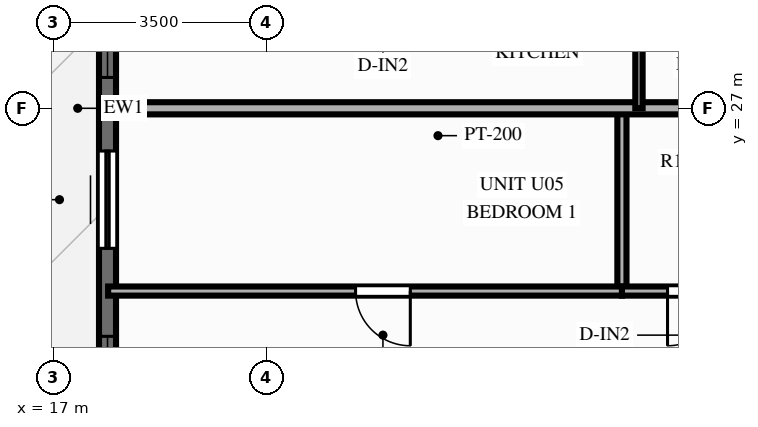
"""IFC4 building model, lengths in metres.
Left out: names, types, materials, properties, quantities, classifications, styles, units other than length and angle.
Written with IfcOpenShell. Run it as: python <this file> out.ifc"""

import sys

from ifc_helpers import new_model, si_unit, direction, frame, frame_2d, origin, place, context, subcontext, project, spatial, rectangle, extrude, source, transform, mapped, element, fill, save


model = new_model("IFC4")
c1 = context("Model", 3, precision=1e-05, world=origin(), true_north=direction((0.0, 1.0)))
c2 = subcontext(c1, "Body", "Model", "MODEL_VIEW")
j1 = project(units=[si_unit("LENGTHUNIT", "METRE"), si_unit("PLANEANGLEUNIT", "RADIAN")], contexts=[c1])
p1 = place(None, origin())
s1 = spatial("IfcSite", under=j1, at=p1, CompositionType="ELEMENT")
p2 = place(p1, origin())
s2 = spatial("IfcBuilding", under=s1, at=p2, CompositionType="ELEMENT")
p3 = place(p2, frame((0.0, 0.0, 186.7)))
s3 = spatial("IfcBuildingStorey", under=s2, at=p3, CompositionType="ELEMENT", Elevation=186.7)
p4 = place(p3, frame((17.89, 11.0, 0.0), z_axis=(0.0, 0.0, 1.0), x_axis=(0.0, 1.0, 0.0)))
e1 = element("IfcWall", 1, at=p4, inside=s3, PredefinedType="SOLIDWALL", context=c2, shape_type="SweptSolid", body=[
    extrude(rectangle(XDim=32.0, YDim=0.28, at=frame_2d((16.0, 0.0))), origin(), (0.0, 0.0, 1.0), 2.28),
])
p5 = place(p4, frame((0.717, 0.0, 0.25)))
e2 = element("IfcOpeningElement", 2, at=p5, cuts=e1, PredefinedType="OPENING", context=c2, shape_type="SweptSolid", body=[
    extrude(rectangle(XDim=1.2, YDim=1.5, at=frame_2d((0.6, 0.75))), frame((0.0, 0.152, 0.0), z_axis=(0.0, -1.0, 0.0), x_axis=(1.0, 0.0, 0.0)), (0.0, 0.0, 1.0), 0.304),
])
p6 = place(p4, frame((3.139, 0.0, 0.25)))
e3 = element("IfcOpeningElement", 3, at=p6, cuts=e1, PredefinedType="OPENING", context=c2, shape_type="SweptSolid", body=[
    extrude(rectangle(XDim=1.2, YDim=1.5, at=frame_2d((0.6, 0.75))), frame((0.0, 0.152, 0.0), z_axis=(0.0, -1.0, 0.0), x_axis=(1.0, 0.0, 0.0)), (0.0, 0.0, 1.0), 0.304),
])
p7 = place(p4, frame((5.447, 0.0, 0.25)))
e4 = element("IfcOpeningElement", 4, at=p7, cuts=e1, PredefinedType="OPENING", context=c2, shape_type="SweptSolid", body=[
    extrude(rectangle(XDim=0.95, YDim=1.5, at=frame_2d((0.475, 0.75))), frame((0.0, 0.152, 0.0), z_axis=(0.0, -1.0, 0.0), x_axis=(1.0, 0.0, 0.0)), (0.0, 0.0, 1.0), 0.304),
])
p8 = place(p4, frame((8.597, 0.0, 0.25)))
e5 = element("IfcOpeningElement", 5, at=p8, cuts=e1, PredefinedType="OPENING", context=c2, shape_type="SweptSolid", body=[
    extrude(rectangle(XDim=1.2, YDim=1.5, at=frame_2d((0.6, 0.75))), frame((0.0, 0.152, 0.0), z_axis=(0.0, -1.0, 0.0), x_axis=(1.0, 0.0, 0.0)), (0.0, 0.0, 1.0), 0.304),
])
p9 = place(p4, frame((11.05, 0.0, 0.25)))
e6 = element("IfcOpeningElement", 6, at=p9, cuts=e1, PredefinedType="OPENING", context=c2, shape_type="SweptSolid", body=[
    extrude(rectangle(XDim=1.2, YDim=1.5, at=frame_2d((0.6, 0.75))), frame((0.0, 0.152, 0.0), z_axis=(0.0, -1.0, 0.0), x_axis=(1.0, 0.0, 0.0)), (0.0, 0.0, 1.0), 0.304),
])
p10 = place(p4, frame((13.697, 0.0, 0.0)))
e7 = element("IfcOpeningElement", 7, at=p10, cuts=e1, PredefinedType="OPENING", context=c2, shape_type="SweptSolid", body=[
    extrude(rectangle(XDim=1.6, YDim=2.15, at=frame_2d((0.8, 1.075))), frame((0.0, 0.152, 0.0), z_axis=(0.0, -1.0, 0.0), x_axis=(1.0, 0.0, 0.0)), (0.0, 0.0, 1.0), 0.304),
])
p11 = place(p4, frame((16.507, 0.0, 0.25)))
e8 = element("IfcOpeningElement", 8, at=p11, cuts=e1, PredefinedType="OPENING", context=c2, shape_type="SweptSolid", body=[
    extrude(rectangle(XDim=1.2, YDim=1.5, at=frame_2d((0.6, 0.75))), frame((0.0, 0.152, 0.0), z_axis=(0.0, -1.0, 0.0), x_axis=(1.0, 0.0, 0.0)), (0.0, 0.0, 1.0), 0.304),
])
p12 = place(p4, frame((18.959, 0.0, 0.25)))
e9 = element("IfcOpeningElement", 9, at=p12, cuts=e1, PredefinedType="OPENING", context=c2, shape_type="SweptSolid", body=[
    extrude(rectangle(XDim=1.2, YDim=1.5, at=frame_2d((0.6, 0.75))), frame((0.0, 0.152, 0.0), z_axis=(0.0, -1.0, 0.0), x_axis=(1.0, 0.0, 0.0)), (0.0, 0.0, 1.0), 0.304),
])
p13 = place(p4, frame((21.807, 0.0, 0.25)))
e10 = element("IfcOpeningElement", 10, at=p13, cuts=e1, PredefinedType="OPENING", context=c2, shape_type="SweptSolid", body=[
    extrude(rectangle(XDim=1.2, YDim=1.5, at=frame_2d((0.6, 0.75))), frame((0.0, 0.152, 0.0), z_axis=(0.0, -1.0, 0.0), x_axis=(1.0, 0.0, 0.0)), (0.0, 0.0, 1.0), 0.304),
])
p14 = place(p4, frame((26.967, 0.0, 0.25)))
e11 = element("IfcOpeningElement", 11, at=p14, cuts=e1, PredefinedType="OPENING", context=c2, shape_type="SweptSolid", body=[
    extrude(rectangle(XDim=1.2, YDim=1.5, at=frame_2d((0.6, 0.75))), frame((0.0, 0.152, 0.0), z_axis=(0.0, -1.0, 0.0), x_axis=(1.0, 0.0, 0.0)), (0.0, 0.0, 1.0), 0.304),
])
p15 = place(p4, frame((29.687, 0.0, 0.25)))
e12 = element("IfcOpeningElement", 12, at=p15, cuts=e1, PredefinedType="OPENING", context=c2, shape_type="SweptSolid", body=[
    extrude(rectangle(XDim=1.2, YDim=1.5, at=frame_2d((0.6, 0.75))), frame((0.0, 0.152, 0.0), z_axis=(0.0, -1.0, 0.0), x_axis=(1.0, 0.0, 0.0)), (0.0, 0.0, 1.0), 0.304),
])
p16 = place(p3, frame((26.35, 23.994, 0.0), z_axis=(0.0, 0.0, 1.0), x_axis=(0.0, 1.0, 0.0)))
e13 = element("IfcWall", 13, at=p16, inside=s3, PredefinedType="PARTITIONING", context=c2, shape_type="SweptSolid", body=[
    extrude(rectangle(XDim=3.006, YDim=0.15, at=frame_2d((1.503, 0.0))), origin(), (0.0, 0.0, 1.0), 2.79),
])
p17 = place(p3, frame((28.75, 23.994, 0.0), z_axis=(0.0, 0.0, 1.0), x_axis=(-1.0, 0.0, 0.0)))
e14 = element("IfcWall", 14, at=p17, inside=s3, PredefinedType="PARTITIONING", context=c2, shape_type="SweptSolid", body=[
    extrude(rectangle(XDim=2.4, YDim=0.15, at=frame_2d((1.2, 0.0))), origin(), (0.0, 0.0, 1.0), 2.79),
])
p18 = place(p17, frame((0.75, 0.0, 0.0)))
e15 = element("IfcOpeningElement", 15, at=p18, cuts=e14, PredefinedType="OPENING", context=c2, shape_type="SweptSolid", body=[
    extrude(rectangle(XDim=0.9, YDim=2.1, at=frame_2d((0.45, 1.05))), frame((0.0, 0.087, 0.0), z_axis=(0.0, -1.0, 0.0), x_axis=(1.0, 0.0, 0.0)), (0.0, 0.0, 1.0), 0.174),
])
p19 = place(p3, frame((26.35, 23.994, 0.0), z_axis=(0.0, 0.0, 1.0), x_axis=(-1.0, 0.0, 0.0)))
e16 = element("IfcWall", 16, at=p19, inside=s3, PredefinedType="PARTITIONING", context=c2, shape_type="SweptSolid", body=[
    extrude(rectangle(XDim=8.45, YDim=0.15, at=frame_2d((4.225, 0.0))), origin(), (0.0, 0.0, 1.0), 2.79),
])
p20 = place(p19, frame((3.48, 0.0, 0.0)))
e17 = element("IfcOpeningElement", 17, at=p20, cuts=e16, PredefinedType="OPENING", context=c2, shape_type="SweptSolid", body=[
    extrude(rectangle(XDim=0.9, YDim=2.1, at=frame_2d((0.45, 1.05))), frame((0.0, 0.087, 0.0), z_axis=(0.0, -1.0, 0.0), x_axis=(1.0, 0.0, 0.0)), (0.0, 0.0, 1.0), 0.174),
])
p21 = place(p3, frame((28.75, 27.0, 0.0), z_axis=(0.0, 0.0, 1.0), x_axis=(-1.0, 0.0, 0.0)))
e18 = element("IfcWall", 18, at=p21, inside=s3, PredefinedType="PARTITIONING", context=c2, shape_type="SweptSolid", body=[
    extrude(rectangle(XDim=10.85, YDim=0.2, at=frame_2d((5.425, 0.0))), origin(), (0.0, 0.0, 1.0), 2.79),
])
p22 = place(p3, frame((26.63, 27.0, 0.0), z_axis=(0.0, 0.0, 1.0), x_axis=(0.0, 1.0, 0.0)))
e19 = element("IfcWall", 19, at=p22, inside=s3, PredefinedType="PARTITIONING", context=c2, shape_type="SweptSolid", body=[
    extrude(rectangle(XDim=2.215, YDim=0.12, at=frame_2d((1.107, 0.0))), origin(), (0.0, 0.0, 1.0), 2.79),
])
m1 = source(origin(), c2, "Body", "SweptSolid", [
    extrude(rectangle(XDim=1.2, YDim=1.5, at=frame_2d((0.6, 0.75))), frame((0.0, 0.03, 0.0), z_axis=(0.0, -1.0, 0.0), x_axis=(1.0, 0.0, 0.0)), (0.0, 0.0, 1.0), 0.06),
])
p23 = place(p9, origin())
e20 = element("IfcWindow", 20, at=p23, inside=s3, PartitioningType="SINGLE_PANEL", PredefinedType="WINDOW", context=c2, shape_type="MappedRepresentation", body=[
    mapped(m1, transform((0.0, 0.0, 0.0), scale=1.0)),
])
fill(e6, e20)
m2 = source(origin(), c2, "Body", "SweptSolid", [
    extrude(rectangle(XDim=1.6, YDim=2.15, at=frame_2d((0.8, 1.075))), frame((0.0, 0.025, 0.0), z_axis=(0.0, -1.0, 0.0), x_axis=(1.0, 0.0, 0.0)), (0.0, 0.0, 1.0), 0.05),
])
p24 = place(p10, origin())
e21 = element("IfcDoor", 21, at=p24, inside=s3, OperationType="SLIDING_TO_LEFT", PredefinedType="DOOR", context=c2, shape_type="MappedRepresentation", body=[
    mapped(m2, transform((0.0, 0.0, 0.0), scale=1.0)),
])
fill(e7, e21)
p25 = place(p11, origin())
e22 = element("IfcWindow", 22, at=p25, inside=s3, PartitioningType="SINGLE_PANEL", PredefinedType="WINDOW", context=c2, shape_type="MappedRepresentation", body=[
    mapped(m1, transform((0.0, 0.0, 0.0), scale=1.0)),
])
fill(e8, e22)
m3 = source(origin(), c2, "Body", "SweptSolid", [
    extrude(rectangle(XDim=0.9, YDim=2.1, at=frame_2d((0.45, 1.05))), frame((0.0, 0.025, 0.0), z_axis=(0.0, -1.0, 0.0), x_axis=(1.0, 0.0, 0.0)), (0.0, 0.0, 1.0), 0.05),
])
p26 = place(p18, origin())
e23 = element("IfcDoor", 23, at=p26, inside=s3, OperationType="SINGLE_SWING_RIGHT", PredefinedType="DOOR", context=c2, shape_type="MappedRepresentation", body=[
    mapped(m3, transform((0.0, 0.0, 0.0), scale=1.0)),
])
fill(e15, e23)
p27 = place(p20, origin())
e24 = element("IfcDoor", 24, at=p27, inside=s3, OperationType="SINGLE_SWING_LEFT", PredefinedType="DOOR", context=c2, shape_type="MappedRepresentation", body=[
    mapped(m3, transform((0.0, 0.0, 0.0), scale=1.0)),
])
fill(e17, e24)
save(model, sys.argv[1])
